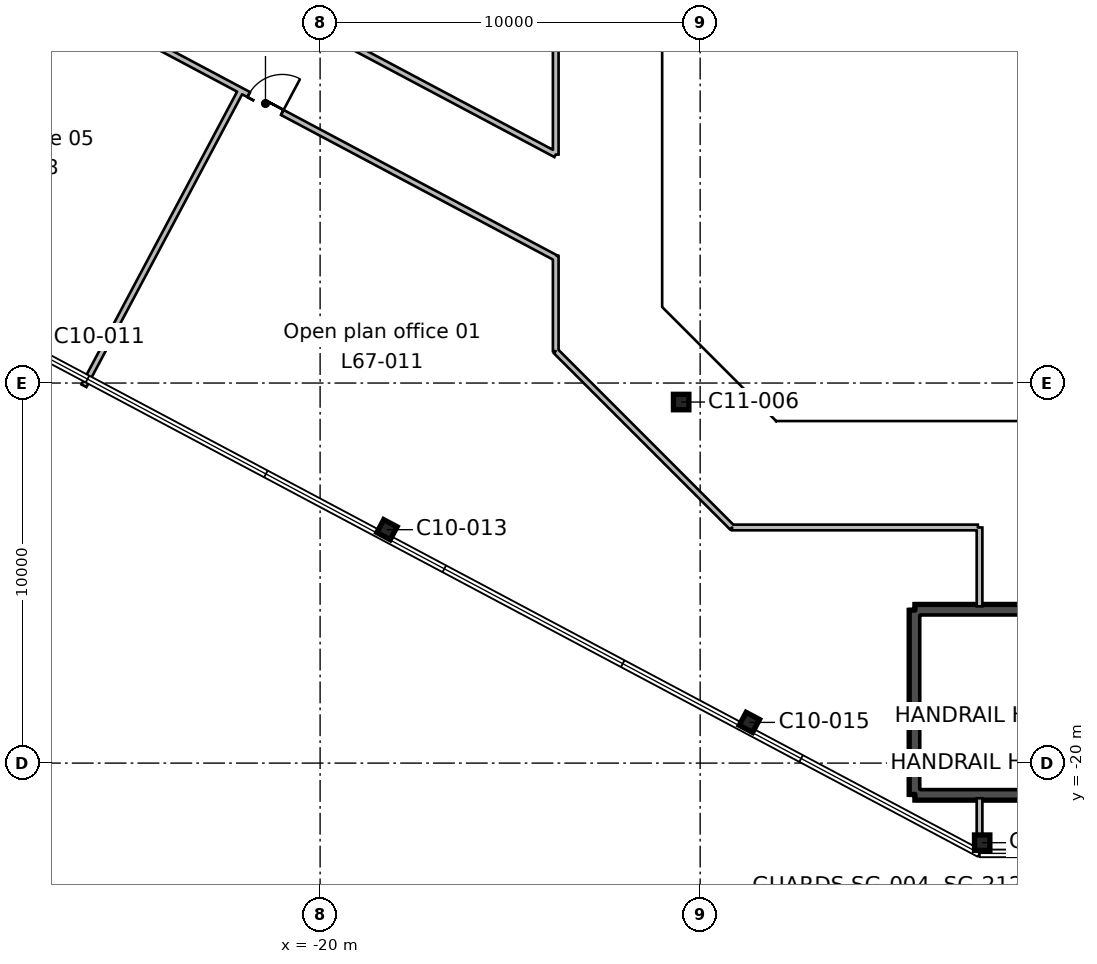
"""IFC4 building model, lengths in metres.
Left out: names, types, materials, properties, quantities, classifications, styles, units other than length and angle.
Written with IfcOpenShell. Run it as: python <this file> out.ifc"""

import sys

from ifc_helpers import new_model, si_unit, direction, frame, frame_2d, origin, origin_2d, place, context, subcontext, project, spatial, rectangle, hollow_rectangle, i_section, extrude, element, fill, save


model = new_model("IFC4")
c1 = context("Model", 3, precision=1e-05, world=origin(), true_north=direction((0.0, 1.0)))
c2 = subcontext(c1, "Body", "Model", "MODEL_VIEW")
j1 = project(units=[si_unit("LENGTHUNIT", "METRE"), si_unit("PLANEANGLEUNIT", "RADIAN")], contexts=[c1])
p1 = place(None, origin())
s1 = spatial("IfcSite", under=j1, at=p1, CompositionType="ELEMENT")
p2 = place(p1, origin())
s2 = spatial("IfcBuilding", under=s1, at=p2, CompositionType="ELEMENT")
p3 = place(p2, frame((0.0, 0.0, 297.0)))
s3 = spatial("IfcBuildingStorey", under=s2, at=p3, CompositionType="ELEMENT", Elevation=297.0)
p4 = place(p3, frame((-2.579, -22.094, 0.0), z_axis=(0.0, 0.0, 1.0), x_axis=(1.0, 0.0, 0.0)))
e1 = element("IfcColumn", 1, at=p4, inside=s3, PredefinedType="COLUMN", context=c2, shape_type="SweptSolid", body=[
    extrude(i_section(OverallWidth=0.404, OverallDepth=0.406, WebThickness=0.027, FlangeThickness=0.044, FilletRadius=0.015, at=origin_2d()), origin(), (0.0, 0.0, 1.0), 3.9),
])
for number, where, z_axis, x_axis in (
    (2, (-8.705, -18.929, 0.0), (0.0, 0.0, 1.0), (0.883, -0.469, 0.0)),
    (3, (-18.241, -13.858, 0.0), (0.0, 0.0, 1.0), (0.883, -0.469, 0.0)),
):
    element("IfcColumn", number, at=place(p3, frame(where, z_axis=z_axis, x_axis=x_axis)), inside=s3, PredefinedType="COLUMN", context=c2, shape_type="SweptSolid", body=[
        extrude(i_section(OverallWidth=0.399, OverallDepth=0.386, WebThickness=0.021, FlangeThickness=0.033, FilletRadius=0.015, at=origin_2d()), origin(), (0.0, 0.0, 1.0), 3.9),
    ])
p5 = place(p3, frame((-10.5, -10.5, 0.0), z_axis=(0.0, 0.0, 1.0), x_axis=(1.0, 0.0, 0.0)))
e4 = element("IfcColumn", 4, at=p5, inside=s3, PredefinedType="COLUMN", context=c2, shape_type="SweptSolid", body=[
    extrude(hollow_rectangle(XDim=0.406, YDim=0.406, WallThickness=0.009, InnerFilletRadius=0.004, OuterFilletRadius=0.013, at=origin_2d()), origin(), (0.0, 0.0, 1.0), 3.9),
])
p6 = place(p3, frame((3.95, -20.825, 0.0), z_axis=(0.0, 0.0, 1.0), x_axis=(-1.0, 0.0, 0.0)))
e5 = element("IfcWall", 5, at=p6, inside=s3, PredefinedType="SHEAR", context=c2, shape_type="SweptSolid", body=[
    extrude(rectangle(XDim=8.3, YDim=0.3, at=frame_2d((4.15, 0.0))), origin(), (0.0, 0.0, 1.0), 3.9),
])
p7 = place(p3, frame((-4.35, -20.825, 0.0), z_axis=(0.0, 0.0, 1.0), x_axis=(0.0, 1.0, 0.0)))
e6 = element("IfcWall", 6, at=p7, inside=s3, PredefinedType="SHEAR", context=c2, shape_type="SweptSolid", body=[
    extrude(rectangle(XDim=4.85, YDim=0.3, at=frame_2d((2.425, 0.0))), origin(), (0.0, 0.0, 1.0), 3.9),
])
p8 = place(p3, frame((-4.35, -15.975, 0.0), z_axis=(0.0, 0.0, 1.0), x_axis=(1.0, 0.0, 0.0)))
e7 = element("IfcWall", 7, at=p8, inside=s3, PredefinedType="SHEAR", context=c2, shape_type="SweptSolid", body=[
    extrude(rectangle(XDim=8.3, YDim=0.3, at=frame_2d((4.15, 0.0))), origin(), (0.0, 0.0, 1.0), 3.9),
])
p9 = place(p8, frame((6.05, 0.0, 0.0)))
e8 = element("IfcOpeningElement", 8, at=p9, cuts=e7, PredefinedType="OPENING", context=c2, shape_type="SweptSolid", body=[
    extrude(rectangle(XDim=1.9, YDim=2.1, at=frame_2d((0.95, 1.05))), frame((0.0, 0.16, 0.0), z_axis=(0.0, -1.0, 0.0), x_axis=(1.0, 0.0, 0.0)), (0.0, 0.0, 1.0), 0.32),
])
p10 = place(p3, frame((-13.8, -6.706, 0.0), z_axis=(0.0, 0.0, 1.0), x_axis=(-0.882947286887, 0.469472138235, 0.0)))
e9 = element("IfcWall", 9, at=p10, inside=s3, PredefinedType="PARTITIONING", context=c2, shape_type="SweptSolid", body=[
    extrude(rectangle(XDim=36.571, YDim=0.15, at=frame_2d((18.285, 0.0))), origin(), (0.0, 0.0, 1.0), 3.54),
])
p11 = place(p10, frame((25.55, 0.0, 0.0)))
e10 = element("IfcOpeningElement", 10, at=p11, cuts=e9, PredefinedType="OPENING", context=c2, shape_type="SweptSolid", body=[
    extrude(rectangle(XDim=1.0, YDim=2.1, at=frame_2d((0.5, 1.05))), frame((0.0, 0.085, 0.0), z_axis=(0.0, -1.0, 0.0), x_axis=(1.0, 0.0, 0.0)), (0.0, 0.0, 1.0), 0.17),
])
p12 = place(p10, frame((17.75, 0.0, 0.0)))
e11 = element("IfcOpeningElement", 11, at=p12, cuts=e9, PredefinedType="OPENING", context=c2, shape_type="SweptSolid", body=[
    extrude(rectangle(XDim=1.0, YDim=2.1, at=frame_2d((0.5, 1.05))), frame((0.0, 0.085, 0.0), z_axis=(0.0, -1.0, 0.0), x_axis=(1.0, 0.0, 0.0)), (0.0, 0.0, 1.0), 0.17),
])
p13 = place(p10, frame((8.15, 0.0, 0.0)))
e12 = element("IfcOpeningElement", 12, at=p13, cuts=e9, PredefinedType="OPENING", context=c2, shape_type="SweptSolid", body=[
    extrude(rectangle(XDim=1.0, YDim=2.1, at=frame_2d((0.5, 1.05))), frame((0.0, 0.085, 0.0), z_axis=(0.0, -1.0, 0.0), x_axis=(1.0, 0.0, 0.0)), (0.0, 0.0, 1.0), 0.17),
])
p14 = place(p3, frame((-22.083, -2.302, 0.0), z_axis=(0.0, 0.0, 1.0), x_axis=(-0.469445946219, -0.882961212952, 0.0)))
e13 = element("IfcWall", 13, at=p14, inside=s3, PredefinedType="PARTITIONING", context=c2, shape_type="SweptSolid", body=[
    extrude(rectangle(XDim=8.8, YDim=0.15, at=frame_2d((4.4, 0.0))), origin(), (0.0, 0.0, 1.0), 3.54),
])
p15 = place(p3, frame((-2.693, -13.8, 0.0), z_axis=(0.0, 0.0, 1.0), x_axis=(-1.0, 0.0, 0.0)))
e14 = element("IfcWall", 14, at=p15, inside=s3, PredefinedType="PARTITIONING", context=c2, shape_type="SweptSolid", body=[
    extrude(rectangle(XDim=6.467, YDim=0.15, at=frame_2d((3.233, 0.0))), origin(), (0.0, 0.0, 1.0), 3.54),
])
p16 = place(p3, frame((-9.16, -13.8, 0.0), z_axis=(0.0, 0.0, 1.0), x_axis=(-0.707106781187, 0.707106781187, 0.0)))
e15 = element("IfcWall", 15, at=p16, inside=s3, PredefinedType="PARTITIONING", context=c2, shape_type="SweptSolid", body=[
    extrude(rectangle(XDim=6.562, YDim=0.15, at=frame_2d((3.281, 0.0))), origin(), (0.0, 0.0, 1.0), 3.54),
])
p17 = place(p3, frame((-13.8, -9.16, 0.0), z_axis=(0.0, 0.0, 1.0), x_axis=(0.0, 1.0, 0.0)))
e16 = element("IfcWall", 16, at=p17, inside=s3, PredefinedType="PARTITIONING", context=c2, shape_type="SweptSolid", body=[
    extrude(rectangle(XDim=2.504, YDim=0.15, at=frame_2d((1.252, 0.0))), origin(), (0.0, 0.0, 1.0), 3.54),
])
p18 = place(p3, frame((-2.649, -15.875, 0.0), z_axis=(0.0, 0.0, 1.0), x_axis=(0.0, 1.0, 0.0)))
e17 = element("IfcWall", 17, at=p18, inside=s3, PredefinedType="PARTITIONING", context=c2, shape_type="SweptSolid", body=[
    extrude(rectangle(XDim=2.075, YDim=0.15, at=frame_2d((1.038, 0.0))), origin(), (0.0, 0.0, 1.0), 3.54),
])
p19 = place(p3, frame((-2.649, -20.925, 0.0), z_axis=(0.0, 0.0, 1.0), x_axis=(0.0, -1.0, 0.0)))
e18 = element("IfcWall", 18, at=p19, inside=s3, PredefinedType="PARTITIONING", context=c2, shape_type="SweptSolid", body=[
    extrude(rectangle(XDim=0.966, YDim=0.15, at=frame_2d((0.483, 0.0))), origin(), (0.0, 0.0, 1.0), 3.54),
])
p20 = place(p3, frame((-13.8, 9.16, 0.0), z_axis=(0.0, 0.0, 1.0), x_axis=(0.0, -1.0, 0.0)))
e19 = element("IfcWall", 19, at=p20, inside=s3, PredefinedType="PARTITIONING", context=c2, shape_type="SweptSolid", body=[
    extrude(rectangle(XDim=13.148, YDim=0.15, at=frame_2d((6.574, 0.0))), origin(), (0.0, 0.0, 1.0), 3.54),
])
p21 = place(p3, frame((-13.8, -3.988, 0.0), z_axis=(0.0, 0.0, 1.0), x_axis=(-0.882949137368, 0.469468657976, 0.0)))
e20 = element("IfcWall", 20, at=p21, inside=s3, PredefinedType="PARTITIONING", context=c2, shape_type="SweptSolid", body=[
    extrude(rectangle(XDim=7.688, YDim=0.15, at=frame_2d((3.844, 0.0))), origin(), (0.0, 0.0, 1.0), 3.54),
])
p22 = place(p13, frame((1.0, 0.0, 0.0), z_axis=(0.0, 0.0, 1.0), x_axis=(-1.0, 0.0, 0.0)))
e21 = element("IfcDoor", 21, at=p22, inside=s3, OperationType="SINGLE_SWING_RIGHT", PredefinedType="DOOR", context=c2, shape_type="SweptSolid", body=[
    extrude(rectangle(XDim=1.0, YDim=2.1, at=frame_2d((0.5, 1.05))), frame((0.0, 0.025, 0.0), z_axis=(0.0, -1.0, 0.0), x_axis=(1.0, 0.0, 0.0)), (0.0, 0.0, 1.0), 0.05),
])
fill(e12, e21)
save(model, sys.argv[1])
